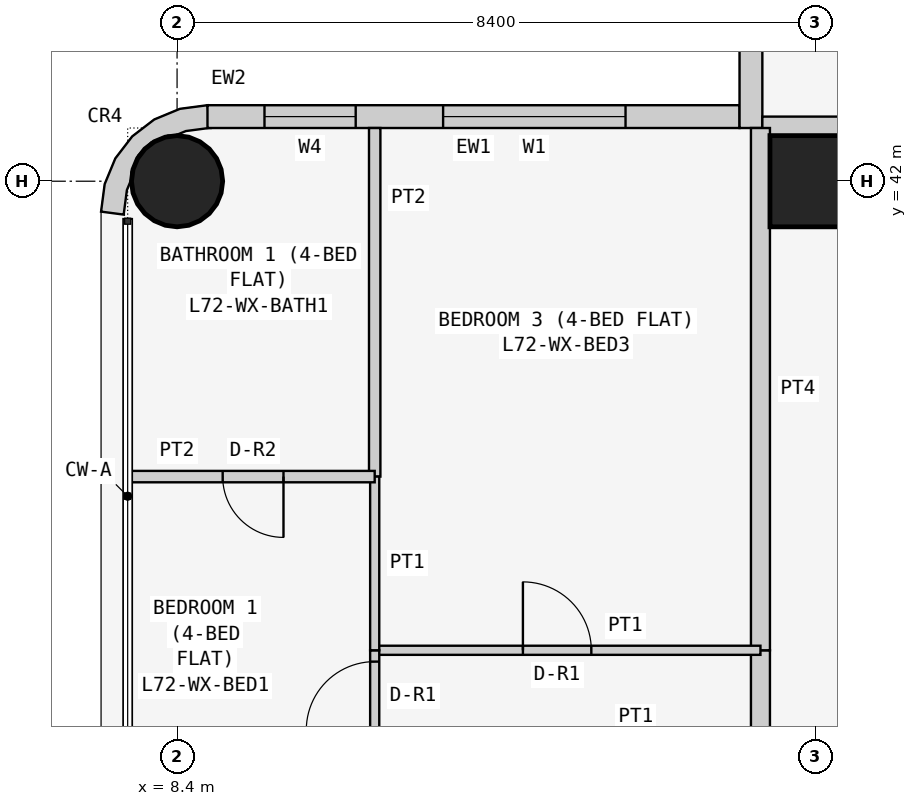
"""IFC4 building model, lengths in metres.
Left out: names, types, materials, properties, quantities, classifications, styles, units other than length and angle.
Written with IfcOpenShell. Run it as: python <this file> out.ifc"""

import sys

from ifc_helpers import new_model, si_unit, direction, frame, frame_2d, origin, origin_2d, place, context, subcontext, project, spatial, polyline, rectangle, circle, outline, extrude, element, fill, save


model = new_model("IFC4")
c1 = context("Model", 3, precision=1e-05, world=origin(), true_north=direction((0.0, 1.0)))
c2 = subcontext(c1, "Body", "Model", "MODEL_VIEW")
j1 = project(units=[si_unit("LENGTHUNIT", "METRE"), si_unit("PLANEANGLEUNIT", "RADIAN")], contexts=[c1])
p1 = place(None, origin())
s1 = spatial("IfcSite", under=j1, at=p1, CompositionType="ELEMENT")
p2 = place(p1, origin())
s2 = spatial("IfcBuilding", under=s1, at=p2, CompositionType="ELEMENT")
p3 = place(p2, frame((0.0, 0.0, 275.7)))
s3 = spatial("IfcBuildingStorey", under=s2, at=p3, CompositionType="ELEMENT", Elevation=275.7)
p4 = place(p3, frame((8.4, 42.0, 0.0), z_axis=(0.0, 0.0, 1.0), x_axis=(1.0, 0.0, 0.0)))
e1 = element("IfcColumn", 1, at=p4, inside=s3, PredefinedType="COLUMN", context=c2, shape_type="SweptSolid", body=[
    extrude(circle(Radius=0.6, at=origin_2d()), origin(), (0.0, 0.0, 1.0), 3.6),
])
p5 = place(p3, frame((16.8, 42.0, 0.0), z_axis=(0.0, 0.0, 1.0), x_axis=(1.0, 0.0, 0.0)))
e2 = element("IfcColumn", 2, at=p5, inside=s3, PredefinedType="COLUMN", context=c2, shape_type="SweptSolid", body=[
    extrude(rectangle(XDim=1.2, YDim=1.2, at=origin_2d()), origin(), (0.0, 0.0, 1.0), 3.6),
])
p6 = place(p3, frame((15.8, 42.85, 0.0), z_axis=(0.0, 0.0, 1.0), x_axis=(-1.0, 0.0, 0.0)))
e3 = element("IfcWall", 3, at=p6, inside=s3, PredefinedType="SOLIDWALL", context=c2, shape_type="SweptSolid", body=[
    extrude(rectangle(XDim=7.0, YDim=0.3, at=frame_2d((3.5, 0.0))), origin(), (0.0, 0.0, 1.0), 3.45),
])
p7 = place(p6, frame((1.5, 0.0, 0.9)))
e4 = element("IfcOpeningElement", 4, at=p7, cuts=e3, PredefinedType="OPENING", context=c2, shape_type="SweptSolid", body=[
    extrude(rectangle(XDim=2.4, YDim=1.5, at=frame_2d((1.2, 0.75))), frame((0.0, 0.16, 0.0), z_axis=(0.0, -1.0, 0.0), x_axis=(1.0, 0.0, 0.0)), (0.0, 0.0, 1.0), 0.32),
])
p8 = place(p6, frame((5.05, 0.0, 0.9)))
e5 = element("IfcOpeningElement", 5, at=p8, cuts=e3, PredefinedType="OPENING", context=c2, shape_type="SweptSolid", body=[
    extrude(rectangle(XDim=1.2, YDim=1.5, at=frame_2d((0.6, 0.75))), frame((0.0, 0.16, 0.0), z_axis=(0.0, -1.0, 0.0), x_axis=(1.0, 0.0, 0.0)), (0.0, 0.0, 1.0), 0.32),
])
p9 = place(p3, frame((15.95, 50.0, 0.0), z_axis=(0.0, 0.0, 1.0), x_axis=(0.0, -1.0, 0.0)))
e6 = element("IfcWall", 6, at=p9, inside=s3, PredefinedType="SOLIDWALL", context=c2, shape_type="SweptSolid", body=[
    extrude(rectangle(XDim=7.3, YDim=0.3, at=frame_2d((3.65, 0.0))), origin(), (0.0, 0.0, 1.0), 3.45),
])
p10 = place(p9, frame((3.1, 0.0, 0.9)))
e7 = element("IfcOpeningElement", 7, at=p10, cuts=e6, PredefinedType="OPENING", context=c2, shape_type="SweptSolid", body=[
    extrude(rectangle(XDim=2.4, YDim=1.5, at=frame_2d((1.2, 0.75))), frame((0.0, 0.16, 0.0), z_axis=(0.0, -1.0, 0.0), x_axis=(1.0, 0.0, 0.0)), (0.0, 0.0, 1.0), 0.32),
])
p11 = place(p9, frame((0.75, 0.0, 0.9)))
e8 = element("IfcOpeningElement", 8, at=p11, cuts=e6, PredefinedType="OPENING", context=c2, shape_type="SweptSolid", body=[
    extrude(rectangle(XDim=1.2, YDim=1.5, at=frame_2d((0.6, 0.75))), frame((0.0, 0.16, 0.0), z_axis=(0.0, -1.0, 0.0), x_axis=(1.0, 0.0, 0.0)), (0.0, 0.0, 1.0), 0.32),
])
p12 = place(p3, frame((8.762, 42.576, 0.0), z_axis=(0.0, 0.0, 1.0), x_axis=(-0.707106781187, 0.707106781187, 0.0)))
e9 = element("IfcWall", 9, at=p12, inside=s3, PredefinedType="SOLIDWALL", context=c2, shape_type="SweptSolid", body=[
    extrude(outline(polyline([(0.233, 0.114), (0.047, -0.129), (0.033, -0.143), (0.273, -0.327), (0.495, -0.037), (0.635, 0.3), (0.683, 0.663), (0.635, 1.025), (0.495, 1.363), (0.273, 1.653), (0.033, 1.469), (0.047, 1.455), (0.233, 1.212), (0.292, 1.069), (0.358, 1.003), (0.449, 0.783), (0.449, 0.543), (0.358, 0.322), (0.292, 0.257), (0.233, 0.114)])), origin(), (0.0, 0.0, 1.0), 3.45),
])
p13 = place(p3, frame((16.1, 42.725, 0.0), z_axis=(0.0, 0.0, 1.0), x_axis=(1.0, 0.0, 0.0)))
e10 = element("IfcWall", 10, at=p13, inside=s3, PredefinedType="PARTITIONING", context=c2, shape_type="SweptSolid", body=[
    extrude(rectangle(XDim=6.471, YDim=0.25, at=frame_2d((3.235, 0.0))), origin(), (0.0, 0.0, 1.0), 3.45),
])
p14 = place(p3, frame((16.075, 34.629, 0.0), z_axis=(0.0, 0.0, 1.0), x_axis=(0.0, 1.0, 0.0)))
e11 = element("IfcWall", 11, at=p14, inside=s3, PredefinedType="PARTITIONING", context=c2, shape_type="SweptSolid", body=[
    extrude(rectangle(XDim=1.2, YDim=0.25, at=frame_2d((0.6, 0.0))), origin(), (0.0, 0.0, 1.0), 3.45),
])
p15 = place(p3, frame((16.075, 35.829, 0.0), z_axis=(0.0, 0.0, 1.0), x_axis=(0.0, 1.0, 0.0)))
e12 = element("IfcWall", 12, at=p15, inside=s3, PredefinedType="PARTITIONING", context=c2, shape_type="SweptSolid", body=[
    extrude(rectangle(XDim=6.871, YDim=0.25, at=frame_2d((3.436, 0.0))), origin(), (0.0, 0.0, 1.0), 3.45),
])
p16 = place(p3, frame((11.0, 35.829, 0.0), z_axis=(0.0, 0.0, 1.0), x_axis=(1.0, 0.0, 0.0)))
e13 = element("IfcWall", 13, at=p16, inside=s3, PredefinedType="PARTITIONING", context=c2, shape_type="SweptSolid", body=[
    extrude(rectangle(XDim=5.075, YDim=0.12, at=frame_2d((2.538, 0.0))), origin(), (0.0, 0.0, 1.0), 3.45),
])
p17 = place(p16, frame((1.95, 0.0, 0.0)))
e14 = element("IfcOpeningElement", 14, at=p17, cuts=e13, PredefinedType="OPENING", context=c2, shape_type="SweptSolid", body=[
    extrude(rectangle(XDim=0.9, YDim=2.1, at=frame_2d((0.45, 1.05))), frame((0.0, 0.07, 0.0), z_axis=(0.0, -1.0, 0.0), x_axis=(1.0, 0.0, 0.0)), (0.0, 0.0, 1.0), 0.14),
])
p18 = place(p3, frame((11.0, 34.629, 0.0), z_axis=(0.0, 0.0, 1.0), x_axis=(0.0, 1.0, 0.0)))
e15 = element("IfcWall", 15, at=p18, inside=s3, PredefinedType="PARTITIONING", context=c2, shape_type="SweptSolid", body=[
    extrude(rectangle(XDim=1.2, YDim=0.12, at=frame_2d((0.6, 0.0))), origin(), (0.0, 0.0, 1.0), 3.45),
])
p19 = place(p18, frame((0.151, 0.0, 0.0)))
e16 = element("IfcOpeningElement", 16, at=p19, cuts=e15, PredefinedType="OPENING", context=c2, shape_type="SweptSolid", body=[
    extrude(rectangle(XDim=0.9, YDim=2.1, at=frame_2d((0.45, 1.05))), frame((0.0, 0.07, 0.0), z_axis=(0.0, -1.0, 0.0), x_axis=(1.0, 0.0, 0.0)), (0.0, 0.0, 1.0), 0.14),
])
p20 = place(p3, frame((11.0, 42.7, 0.0), z_axis=(0.0, 0.0, 1.0), x_axis=(0.0, -1.0, 0.0)))
e17 = element("IfcWall", 17, at=p20, inside=s3, PredefinedType="PARTITIONING", context=c2, shape_type="SweptSolid", body=[
    extrude(rectangle(XDim=4.586, YDim=0.15, at=frame_2d((2.293, 0.0))), origin(), (0.0, 0.0, 1.0), 3.45),
])
p21 = place(p3, frame((11.0, 38.114, 0.0), z_axis=(0.0, 0.0, 1.0), x_axis=(0.0, -1.0, 0.0)))
e18 = element("IfcWall", 18, at=p21, inside=s3, PredefinedType="PARTITIONING", context=c2, shape_type="SweptSolid", body=[
    extrude(rectangle(XDim=2.285, YDim=0.12, at=frame_2d((1.143, 0.0))), origin(), (0.0, 0.0, 1.0), 3.45),
])
p22 = place(p3, frame((7.75, 38.114, 0.0), z_axis=(0.0, 0.0, 1.0), x_axis=(1.0, 0.0, 0.0)))
e19 = element("IfcWall", 19, at=p22, inside=s3, PredefinedType="PARTITIONING", context=c2, shape_type="SweptSolid", body=[
    extrude(rectangle(XDim=3.25, YDim=0.15, at=frame_2d((1.625, 0.0))), origin(), (0.0, 0.0, 1.0), 3.45),
])
p23 = place(p22, frame((1.25, 0.0, 0.0)))
e20 = element("IfcOpeningElement", 20, at=p23, cuts=e19, PredefinedType="OPENING", context=c2, shape_type="SweptSolid", body=[
    extrude(rectangle(XDim=0.8, YDim=2.1, at=frame_2d((0.4, 1.05))), frame((0.0, 0.085, 0.0), z_axis=(0.0, -1.0, 0.0), x_axis=(1.0, 0.0, 0.0)), (0.0, 0.0, 1.0), 0.17),
])
p24 = place(p7, origin())
e21 = element("IfcWindow", 21, at=p24, inside=s3, PartitioningType="SINGLE_PANEL", PredefinedType="WINDOW", context=c2, shape_type="SweptSolid", body=[
    extrude(rectangle(XDim=2.4, YDim=1.5, at=frame_2d((1.2, 0.75))), frame((0.0, 0.03, 0.0), z_axis=(0.0, -1.0, 0.0), x_axis=(1.0, 0.0, 0.0)), (0.0, 0.0, 1.0), 0.06),
])
fill(e4, e21)
p25 = place(p8, origin())
e22 = element("IfcWindow", 22, at=p25, inside=s3, PartitioningType="SINGLE_PANEL", PredefinedType="WINDOW", context=c2, shape_type="SweptSolid", body=[
    extrude(rectangle(XDim=1.2, YDim=1.5, at=frame_2d((0.6, 0.75))), frame((0.0, 0.03, 0.0), z_axis=(0.0, -1.0, 0.0), x_axis=(1.0, 0.0, 0.0)), (0.0, 0.0, 1.0), 0.06),
])
fill(e5, e22)
p26 = place(p17, origin())
e23 = element("IfcDoor", 23, at=p26, inside=s3, OperationType="SINGLE_SWING_LEFT", PredefinedType="DOOR", context=c2, shape_type="SweptSolid", body=[
    extrude(rectangle(XDim=0.9, YDim=2.1, at=frame_2d((0.45, 1.05))), frame((0.0, 0.025, 0.0), z_axis=(0.0, -1.0, 0.0), x_axis=(1.0, 0.0, 0.0)), (0.0, 0.0, 1.0), 0.05),
])
fill(e14, e23)
p27 = place(p19, origin())
e24 = element("IfcDoor", 24, at=p27, inside=s3, OperationType="SINGLE_SWING_LEFT", PredefinedType="DOOR", context=c2, shape_type="SweptSolid", body=[
    extrude(rectangle(XDim=0.9, YDim=2.1, at=frame_2d((0.45, 1.05))), frame((0.0, 0.025, 0.0), z_axis=(0.0, -1.0, 0.0), x_axis=(1.0, 0.0, 0.0)), (0.0, 0.0, 1.0), 0.05),
])
fill(e16, e24)
p28 = place(p23, frame((0.8, 0.0, 0.0), z_axis=(0.0, 0.0, 1.0), x_axis=(-1.0, 0.0, 0.0)))
e25 = element("IfcDoor", 25, at=p28, inside=s3, OperationType="SINGLE_SWING_LEFT", PredefinedType="DOOR", context=c2, shape_type="SweptSolid", body=[
    extrude(rectangle(XDim=0.8, YDim=2.1, at=frame_2d((0.4, 1.05))), frame((0.0, 0.025, 0.0), z_axis=(0.0, -1.0, 0.0), x_axis=(1.0, 0.0, 0.0)), (0.0, 0.0, 1.0), 0.05),
])
fill(e20, e25)
save(model, sys.argv[1])
